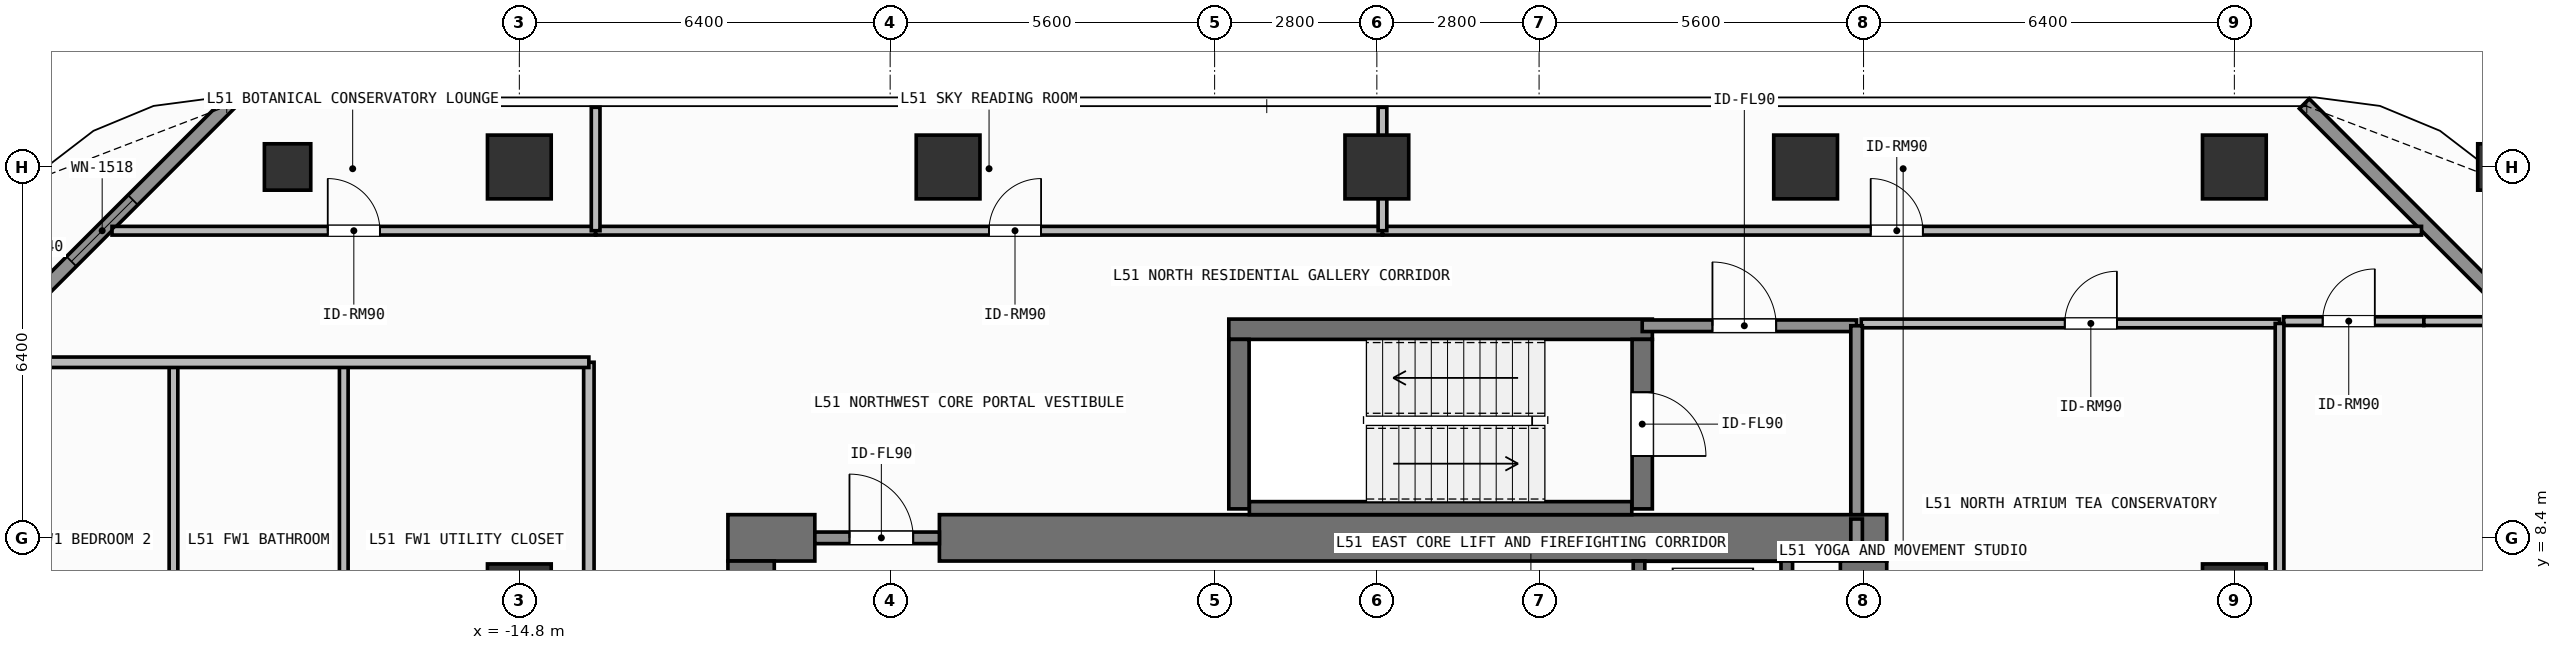
"""IFC4 building model, lengths in metres.
Left out: names, types, materials, properties, quantities, classifications, styles, units other than length and angle.
Written with IfcOpenShell. Run it as: python <this file> out.ifc"""

import sys

from ifc_helpers import new_model, si_unit, direction, frame, frame_2d, origin, origin_2d, place, context, subcontext, project, spatial, rectangle, hollow_rectangle, extrude, element, fill, save


model = new_model("IFC4")
c1 = context("Model", 3, precision=1e-05, world=origin(), true_north=direction((0.0, 1.0)))
c2 = subcontext(c1, "Body", "Model", "MODEL_VIEW")
j1 = project(units=[si_unit("LENGTHUNIT", "METRE"), si_unit("PLANEANGLEUNIT", "RADIAN")], contexts=[c1])
p1 = place(None, origin())
s1 = spatial("IfcSite", under=j1, at=p1, CompositionType="ELEMENT")
p2 = place(p1, origin())
s2 = spatial("IfcBuilding", under=s1, at=p2, CompositionType="ELEMENT")
p3 = place(p2, frame((0.0, 0.0, 207.0)))
s3 = spatial("IfcBuildingStorey", under=s2, at=p3, CompositionType="ELEMENT", Elevation=207.0)
p4 = place(p3, frame((-11.2, 8.4, 0.0), z_axis=(0.0, 0.0, 1.0), x_axis=(1.0, 0.0, 0.0)))
e1 = element("IfcWall", 1, at=p4, inside=s3, PredefinedType="SHEAR", context=c2, shape_type="SweptSolid", body=[
    extrude(rectangle(XDim=1.5, YDim=0.8, at=frame_2d((0.75, 0.0))), origin(), (0.0, 0.0, 1.0), 3.9),
])
p5 = place(p3, frame((-7.55, 8.4, 0.0), z_axis=(0.0, 0.0, 1.0), x_axis=(1.0, 0.0, 0.0)))
e2 = element("IfcWall", 2, at=p5, inside=s3, PredefinedType="SHEAR", context=c2, shape_type="SweptSolid", body=[
    extrude(rectangle(XDim=16.35, YDim=0.8, at=frame_2d((8.175, 0.0))), origin(), (0.0, 0.0, 1.0), 3.9),
])
p6 = place(p3, frame((-10.8, -8.0, 0.0), z_axis=(0.0, 0.0, 1.0), x_axis=(0.0, 1.0, 0.0)))
e3 = element("IfcWall", 3, at=p6, inside=s3, PredefinedType="SHEAR", context=c2, shape_type="SweptSolid", body=[
    extrude(rectangle(XDim=16.0, YDim=0.8, at=frame_2d((8.0, 0.0))), origin(), (0.0, 0.0, 1.0), 3.9),
])
p7 = place(p3, frame((8.4, 5.825, 0.0), z_axis=(0.0, 0.0, 1.0), x_axis=(0.0, 1.0, 0.0)))
e4 = element("IfcWall", 4, at=p7, inside=s3, PredefinedType="SHEAR", context=c2, shape_type="SweptSolid", body=[
    extrude(rectangle(XDim=2.175, YDim=0.8, at=frame_2d((1.087, 0.0))), origin(), (0.0, 0.0, 1.0), 3.9),
])
p8 = place(p3, frame((-2.555, 12.0, 0.0), z_axis=(0.0, 0.0, 1.0), x_axis=(1.0, 0.0, 0.0)))
e5 = element("IfcWall", 5, at=p8, inside=s3, PredefinedType="SHEAR", context=c2, shape_type="SweptSolid", body=[
    extrude(rectangle(XDim=7.31, YDim=0.35, at=frame_2d((3.655, 0.0))), origin(), (0.0, 0.0, 1.0), 3.9),
])
p9 = place(p3, frame((-2.2, 8.913, 0.0), z_axis=(0.0, 0.0, 1.0), x_axis=(1.0, 0.0, 0.0)))
e6 = element("IfcWall", 6, at=p9, inside=s3, PredefinedType="SHEAR", context=c2, shape_type="SweptSolid", body=[
    extrude(rectangle(XDim=6.6, YDim=0.225, at=frame_2d((3.3, 0.0))), origin(), (0.0, 0.0, 1.0), 3.9),
])
p10 = place(p3, frame((-2.38, 8.9, 0.0), z_axis=(0.0, 0.0, 1.0), x_axis=(0.0, 1.0, 0.0)))
e7 = element("IfcWall", 7, at=p10, inside=s3, PredefinedType="SHEAR", context=c2, shape_type="SweptSolid", body=[
    extrude(rectangle(XDim=2.925, YDim=0.35, at=frame_2d((1.462, 0.0))), origin(), (0.0, 0.0, 1.0), 3.9),
])
p11 = place(p3, frame((4.58, 11.825, 0.0), z_axis=(0.0, 0.0, 1.0), x_axis=(0.0, -1.0, 0.0)))
e8 = element("IfcWall", 8, at=p11, inside=s3, PredefinedType="SHEAR", context=c2, shape_type="SweptSolid", body=[
    extrude(rectangle(XDim=2.925, YDim=0.35, at=frame_2d((1.462, 0.0))), origin(), (0.0, 0.0, 1.0), 3.9),
])
p12 = place(p11, frame((0.913, 0.0, 0.0)))
e9 = element("IfcOpeningElement", 9, at=p12, cuts=e8, PredefinedType="OPENING", context=c2, shape_type="SweptSolid", body=[
    extrude(rectangle(XDim=1.1, YDim=2.15, at=frame_2d((0.55, 1.075))), frame((0.0, 0.185, 0.0), z_axis=(0.0, -1.0, 0.0), x_axis=(1.0, 0.0, 0.0)), (0.0, 0.0, 1.0), 0.37),
])
for number, where, z_axis, x_axis in (
    (10, (-14.8, 14.8, 0.0), (0.0, 0.0, 1.0), (1.0, 0.0, 0.0)),
    (11, (-7.4, 14.8, 0.0), (0.0, 0.0, 1.0), (1.0, 0.0, 0.0)),
    (12, (0.0, 14.8, 0.0), (0.0, 0.0, 1.0), (1.0, 0.0, 0.0)),
    (13, (7.4, 14.8, 0.0), (0.0, 0.0, 1.0), (1.0, 0.0, 0.0)),
    (14, (14.8, 14.8, 0.0), (0.0, 0.0, 1.0), (1.0, 0.0, 0.0)),
    (15, (-14.8, 7.4, 0.0), (0.0, 0.0, 1.0), (1.0, 0.0, 0.0)),
    (16, (14.8, 7.4, 0.0), (0.0, 0.0, 1.0), (1.0, 0.0, 0.0)),
):
    element("IfcColumn", number, at=place(p3, frame(where, z_axis=z_axis, x_axis=x_axis)), inside=s3, PredefinedType="COLUMN", context=c2, shape_type="SweptSolid", body=[
        extrude(rectangle(XDim=1.1, YDim=1.1, at=origin_2d()), origin(), (0.0, 0.0, 1.0), 3.9),
    ])
for number, where, z_axis, x_axis in (
    (17, (-18.8, 14.8, 0.0), (0.0, 0.0, 1.0), (1.0, 0.0, 0.0)),
    (18, (19.4, 14.8, 0.0), (0.0, 0.0, 1.0), (1.0, 0.0, 0.0)),
):
    element("IfcColumn", number, at=place(p3, frame(where, z_axis=z_axis, x_axis=x_axis)), inside=s3, PredefinedType="COLUMN", context=c2, shape_type="SweptSolid", body=[
        extrude(hollow_rectangle(XDim=0.8, YDim=0.8, WallThickness=0.036, at=origin_2d()), origin(), (0.0, 0.0, 1.0), 3.9),
    ])
p13 = place(p3, frame((-24.192, 11.508, 0.0), z_axis=(0.0, 0.0, 1.0), x_axis=(0.707106781187, 0.707106781187, 0.0)))
e19 = element("IfcWall", 19, at=p13, inside=s3, PredefinedType="SOLIDWALL", context=c2, shape_type="SweptSolid", body=[
    extrude(rectangle(XDim=6.201, YDim=0.24, at=frame_2d((3.101, 0.0))), origin(), (0.0, 0.0, 1.0), 3.62),
])
p14 = place(p13, frame((2.351, 0.0, 0.8)))
e20 = element("IfcOpeningElement", 20, at=p14, cuts=e19, PredefinedType="OPENING", context=c2, shape_type="SweptSolid", body=[
    extrude(rectangle(XDim=1.5, YDim=1.85, at=frame_2d((0.75, 0.925))), frame((0.0, 0.13, 0.0), z_axis=(0.0, -1.0, 0.0), x_axis=(1.0, 0.0, 0.0)), (0.0, 0.0, 1.0), 0.26),
])
p15 = place(p3, frame((16.008, 15.892, 0.0), z_axis=(0.0, 0.0, 1.0), x_axis=(0.707106781187, -0.707106781187, 0.0)))
e21 = element("IfcWall", 21, at=p15, inside=s3, PredefinedType="SOLIDWALL", context=c2, shape_type="SweptSolid", body=[
    extrude(rectangle(XDim=6.201, YDim=0.24, at=frame_2d((3.101, 0.0))), origin(), (0.0, 0.0, 1.0), 3.62),
])
p16 = place(p3, frame((4.525, 5.825, 0.0), z_axis=(0.0, 0.0, 1.0), x_axis=(0.0, 1.0, 0.0)))
e22 = element("IfcWall", 22, at=p16, inside=s3, PredefinedType="SHEAR", context=c2, shape_type="SweptSolid", body=[
    extrude(rectangle(XDim=2.175, YDim=0.2, at=frame_2d((1.087, 0.0))), origin(), (0.0, 0.0, 1.0), 3.62),
])
p17 = place(p16, frame((0.425, 0.0, 0.0)))
e23 = element("IfcOpeningElement", 23, at=p17, cuts=e22, PredefinedType="OPENING", context=c2, shape_type="SweptSolid", body=[
    extrude(rectangle(XDim=1.1, YDim=2.2, at=frame_2d((0.55, 1.1))), frame((0.0, 0.11, 0.0), z_axis=(0.0, -1.0, 0.0), x_axis=(1.0, 0.0, 0.0)), (0.0, 0.0, 1.0), 0.22),
])
p18 = place(p3, frame((7.075, 5.825, 0.0), z_axis=(0.0, 0.0, 1.0), x_axis=(0.0, 1.0, 0.0)))
e24 = element("IfcWall", 24, at=p18, inside=s3, PredefinedType="SHEAR", context=c2, shape_type="SweptSolid", body=[
    extrude(rectangle(XDim=2.175, YDim=0.2, at=frame_2d((1.087, 0.0))), origin(), (0.0, 0.0, 1.0), 3.62),
])
p19 = place(p3, frame((4.58, 12.06, 0.0), z_axis=(0.0, 0.0, 1.0), x_axis=(1.0, 0.0, 0.0)))
e25 = element("IfcWall", 25, at=p19, inside=s3, PredefinedType="SOLIDWALL", context=c2, shape_type="SweptSolid", body=[
    extrude(rectangle(XDim=3.7, YDim=0.2, at=frame_2d((1.85, 0.0))), origin(), (0.0, 0.0, 1.0), 3.62),
])
p20 = place(p19, frame((1.212, 0.0, 0.0)))
e26 = element("IfcOpeningElement", 26, at=p20, cuts=e25, PredefinedType="OPENING", context=c2, shape_type="SweptSolid", body=[
    extrude(rectangle(XDim=1.1, YDim=2.15, at=frame_2d((0.55, 1.075))), frame((0.0, 0.11, 0.0), z_axis=(0.0, -1.0, 0.0), x_axis=(1.0, 0.0, 0.0)), (0.0, 0.0, 1.0), 0.22),
])
p21 = place(p3, frame((-9.7, 8.4, 0.0), z_axis=(0.0, 0.0, 1.0), x_axis=(1.0, 0.0, 0.0)))
e27 = element("IfcWall", 27, at=p21, inside=s3, PredefinedType="SOLIDWALL", context=c2, shape_type="SweptSolid", body=[
    extrude(rectangle(XDim=2.15, YDim=0.2, at=frame_2d((1.075, 0.0))), origin(), (0.0, 0.0, 1.0), 2.76),
])
p22 = place(p21, frame((0.598, 0.0, 0.0)))
e28 = element("IfcOpeningElement", 28, at=p22, cuts=e27, PredefinedType="OPENING", context=c2, shape_type="SweptSolid", body=[
    extrude(rectangle(XDim=1.1, YDim=2.15, at=frame_2d((0.55, 1.075))), frame((0.0, 0.11, 0.0), z_axis=(0.0, -1.0, 0.0), x_axis=(1.0, 0.0, 0.0)), (0.0, 0.0, 1.0), 0.22),
])
p23 = place(p3, frame((8.36, 12.1, 0.0), z_axis=(0.0, 0.0, 1.0), x_axis=(1.0, 0.0, 0.0)))
e29 = element("IfcWall", 29, at=p23, inside=s3, PredefinedType="PARTITIONING", context=c2, shape_type="SweptSolid", body=[
    extrude(rectangle(XDim=7.22, YDim=0.15, at=frame_2d((3.61, 0.0))), origin(), (0.0, 0.0, 1.0), 3.62),
])
p24 = place(p23, frame((3.513, 0.0, 0.0)))
e30 = element("IfcOpeningElement", 30, at=p24, cuts=e29, PredefinedType="OPENING", context=c2, shape_type="SweptSolid", body=[
    extrude(rectangle(XDim=0.9, YDim=2.1, at=frame_2d((0.45, 1.05))), frame((0.0, 0.085, 0.0), z_axis=(0.0, -1.0, 0.0), x_axis=(1.0, 0.0, 0.0)), (0.0, 0.0, 1.0), 0.17),
])
p25 = place(p3, frame((-21.83, 13.7, 0.0), z_axis=(0.0, 0.0, 1.0), x_axis=(1.0, 0.0, 0.0)))
e31 = element("IfcWall", 31, at=p25, inside=s3, PredefinedType="PARTITIONING", context=c2, shape_type="SweptSolid", body=[
    extrude(rectangle(XDim=8.347, YDim=0.15, at=frame_2d((4.174, 0.0))), origin(), (0.0, 0.0, 1.0), 3.62),
])
p26 = place(p25, frame((3.723, 0.0, 0.0)))
e32 = element("IfcOpeningElement", 32, at=p26, cuts=e31, PredefinedType="OPENING", context=c2, shape_type="SweptSolid", body=[
    extrude(rectangle(XDim=0.9, YDim=2.1, at=frame_2d((0.45, 1.05))), frame((0.0, 0.085, 0.0), z_axis=(0.0, -1.0, 0.0), x_axis=(1.0, 0.0, 0.0)), (0.0, 0.0, 1.0), 0.17),
])
p27 = place(p3, frame((-13.483, 13.7, 0.0), z_axis=(0.0, 0.0, 1.0), x_axis=(1.0, 0.0, 0.0)))
e33 = element("IfcWall", 33, at=p27, inside=s3, PredefinedType="PARTITIONING", context=c2, shape_type="SweptSolid", body=[
    extrude(rectangle(XDim=13.58, YDim=0.15, at=frame_2d((6.79, 0.0))), origin(), (0.0, 0.0, 1.0), 3.62),
])
p28 = place(p27, frame((6.788, 0.0, 0.0)))
e34 = element("IfcOpeningElement", 34, at=p28, cuts=e33, PredefinedType="OPENING", context=c2, shape_type="SweptSolid", body=[
    extrude(rectangle(XDim=0.9, YDim=2.1, at=frame_2d((0.45, 1.05))), frame((0.0, 0.085, 0.0), z_axis=(0.0, -1.0, 0.0), x_axis=(1.0, 0.0, 0.0)), (0.0, 0.0, 1.0), 0.17),
])
p29 = place(p3, frame((0.097, 13.7, 0.0), z_axis=(0.0, 0.0, 1.0), x_axis=(1.0, 0.0, 0.0)))
e35 = element("IfcWall", 35, at=p29, inside=s3, PredefinedType="PARTITIONING", context=c2, shape_type="SweptSolid", body=[
    extrude(rectangle(XDim=17.933, YDim=0.15, at=frame_2d((8.967, 0.0))), origin(), (0.0, 0.0, 1.0), 3.62),
])
p30 = place(p29, frame((8.427, 0.0, 0.0)))
e36 = element("IfcOpeningElement", 36, at=p30, cuts=e35, PredefinedType="OPENING", context=c2, shape_type="SweptSolid", body=[
    extrude(rectangle(XDim=0.9, YDim=2.1, at=frame_2d((0.45, 1.05))), frame((0.0, 0.085, 0.0), z_axis=(0.0, -1.0, 0.0), x_axis=(1.0, 0.0, 0.0)), (0.0, 0.0, 1.0), 0.17),
])
p31 = place(p3, frame((-13.6, -12.12, 0.0), z_axis=(0.0, 0.0, 1.0), x_axis=(0.0, 1.0, 0.0)))
e37 = element("IfcWall", 37, at=p31, inside=s3, PredefinedType="PARTITIONING", context=c2, shape_type="SweptSolid", body=[
    extrude(rectangle(XDim=23.55, YDim=0.18, at=frame_2d((11.775, 0.0))), origin(), (0.0, 0.0, 1.0), 3.62),
])
p32 = place(p31, frame((11.454, 0.0, 0.0)))
e38 = element("IfcOpeningElement", 38, at=p32, cuts=e37, PredefinedType="OPENING", context=c2, shape_type="SweptSolid", body=[
    extrude(rectangle(XDim=1.0, YDim=2.2, at=frame_2d((0.5, 1.1))), frame((0.0, 0.1, 0.0), z_axis=(0.0, -1.0, 0.0), x_axis=(1.0, 0.0, 0.0)), (0.0, 0.0, 1.0), 0.2),
])
p33 = place(p3, frame((15.65, 12.14, 0.0), z_axis=(0.0, 0.0, 1.0), x_axis=(1.0, 0.0, 0.0)))
e39 = element("IfcWall", 39, at=p33, inside=s3, PredefinedType="PARTITIONING", context=c2, shape_type="SweptSolid", body=[
    extrude(rectangle(XDim=2.42, YDim=0.15, at=frame_2d((1.21, 0.0))), origin(), (0.0, 0.0, 1.0), 3.62),
])
p34 = place(p33, frame((0.674, 0.0, 0.0)))
e40 = element("IfcOpeningElement", 40, at=p34, cuts=e39, PredefinedType="OPENING", context=c2, shape_type="SweptSolid", body=[
    extrude(rectangle(XDim=0.9, YDim=2.1, at=frame_2d((0.45, 1.05))), frame((0.0, 0.085, 0.0), z_axis=(0.0, -1.0, 0.0), x_axis=(1.0, 0.0, 0.0)), (0.0, 0.0, 1.0), 0.17),
])
p35 = place(p3, frame((8.28, 8.8, 0.0), z_axis=(0.0, 0.0, 1.0), x_axis=(0.0, 1.0, 0.0)))
e41 = element("IfcWall", 41, at=p35, inside=s3, PredefinedType="SOLIDWALL", context=c2, shape_type="SweptSolid", body=[
    extrude(rectangle(XDim=3.26, YDim=0.2, at=frame_2d((1.63, 0.0))), origin(), (0.0, 0.0, 1.0), 3.62),
])
p36 = place(p3, frame((8.28, 8.1, 0.0), z_axis=(0.0, 0.0, 1.0), x_axis=(0.0, 1.0, 0.0)))
e42 = element("IfcWall", 42, at=p36, inside=s3, PredefinedType="SOLIDWALL", context=c2, shape_type="SweptSolid", body=[
    extrude(rectangle(XDim=0.625, YDim=0.2, at=frame_2d((0.312, 0.0))), origin(), (0.0, 0.0, 1.0), 3.62),
])
p37 = place(p3, frame((15.58, 5.85, 0.0), z_axis=(0.0, 0.0, 1.0), x_axis=(0.0, 1.0, 0.0)))
e43 = element("IfcWall", 43, at=p37, inside=s3, PredefinedType="PARTITIONING", context=c2, shape_type="SweptSolid", body=[
    extrude(rectangle(XDim=6.25, YDim=0.15, at=frame_2d((3.125, 0.0))), origin(), (0.0, 0.0, 1.0), 3.62),
])
for number, where, z_axis, x_axis in (
    (44, (-13.483, 13.7, 0.0), (0.0, 0.0, 1.0), (0.0, 1.0, 0.0)),
    (45, (0.097, 13.7, 0.0), (0.0, 0.0, 1.0), (0.0, 1.0, 0.0)),
):
    element("IfcWall", number, at=place(p3, frame(where, z_axis=z_axis, x_axis=x_axis)), inside=s3, PredefinedType="PARTITIONING", context=c2, shape_type="SweptSolid", body=[
        extrude(rectangle(XDim=2.13, YDim=0.15, at=frame_2d((1.065, 0.0))), origin(), (0.0, 0.0, 1.0), 3.62),
    ])
for number, where, z_axis, x_axis in (
    (46, (-17.83, 5.282, 0.0), (0.0, 0.0, 1.0), (0.0, 1.0, 0.0)),
    (47, (-20.769, 5.282, 0.0), (0.0, 0.0, 1.0), (0.0, 1.0, 0.0)),
):
    element("IfcWall", number, at=place(p3, frame(where, z_axis=z_axis, x_axis=x_axis)), inside=s3, PredefinedType="PARTITIONING", context=c2, shape_type="SweptSolid", body=[
        extrude(rectangle(XDim=6.148, YDim=0.15, at=frame_2d((3.074, 0.0))), origin(), (0.0, 0.0, 1.0), 3.62),
    ])
p38 = place(p3, frame((-24.13, 11.43, 0.0), z_axis=(0.0, 0.0, 1.0), x_axis=(1.0, 0.0, 0.0)))
e48 = element("IfcWall", 48, at=p38, inside=s3, PredefinedType="PARTITIONING", context=c2, shape_type="SweptSolid", body=[
    extrude(rectangle(XDim=10.53, YDim=0.18, at=frame_2d((5.265, 0.0))), origin(), (0.0, 0.0, 1.0), 3.36),
])
p39 = place(p3, frame((18.07, 12.14, 0.0), z_axis=(0.0, 0.0, 1.0), x_axis=(1.0, 0.0, 0.0)))
e49 = element("IfcWall", 49, at=p39, inside=s3, PredefinedType="PARTITIONING", context=c2, shape_type="SweptSolid", body=[
    extrude(rectangle(XDim=1.52, YDim=0.15, at=frame_2d((0.76, 0.0))), origin(), (0.0, 0.0, 1.0), 3.62),
])
p40 = place(p14, origin())
e50 = element("IfcWindow", 50, at=p40, inside=s3, PartitioningType="SINGLE_PANEL", PredefinedType="WINDOW", context=c2, shape_type="SweptSolid", body=[
    extrude(rectangle(XDim=1.5, YDim=1.85, at=frame_2d((0.75, 0.925))), frame((0.0, 0.03, 0.0), z_axis=(0.0, -1.0, 0.0), x_axis=(1.0, 0.0, 0.0)), (0.0, 0.0, 1.0), 0.06),
])
fill(e20, e50)
p41 = place(p12, origin())
e51 = element("IfcDoor", 51, at=p41, inside=s3, OperationType="SINGLE_SWING_RIGHT", PredefinedType="DOOR", context=c2, shape_type="SweptSolid", body=[
    extrude(rectangle(XDim=1.1, YDim=2.15, at=frame_2d((0.55, 1.075))), frame((0.0, 0.025, 0.0), z_axis=(0.0, -1.0, 0.0), x_axis=(1.0, 0.0, 0.0)), (0.0, 0.0, 1.0), 0.05),
])
fill(e9, e51)
p42 = place(p20, origin())
e52 = element("IfcDoor", 52, at=p42, inside=s3, OperationType="SINGLE_SWING_LEFT", PredefinedType="DOOR", context=c2, shape_type="SweptSolid", body=[
    extrude(rectangle(XDim=1.1, YDim=2.15, at=frame_2d((0.55, 1.075))), frame((0.0, 0.025, 0.0), z_axis=(0.0, -1.0, 0.0), x_axis=(1.0, 0.0, 0.0)), (0.0, 0.0, 1.0), 0.05),
])
fill(e26, e52)
p43 = place(p22, origin())
e53 = element("IfcDoor", 53, at=p43, inside=s3, OperationType="SINGLE_SWING_LEFT", PredefinedType="DOOR", context=c2, shape_type="SweptSolid", body=[
    extrude(rectangle(XDim=1.1, YDim=2.15, at=frame_2d((0.55, 1.075))), frame((0.0, 0.025, 0.0), z_axis=(0.0, -1.0, 0.0), x_axis=(1.0, 0.0, 0.0)), (0.0, 0.0, 1.0), 0.05),
])
fill(e28, e53)
p44 = place(p24, origin())
e54 = element("IfcDoor", 54, at=p44, inside=s3, OperationType="SINGLE_SWING_RIGHT", PredefinedType="DOOR", context=c2, shape_type="SweptSolid", body=[
    extrude(rectangle(XDim=0.9, YDim=2.1, at=frame_2d((0.45, 1.05))), frame((0.0, 0.025, 0.0), z_axis=(0.0, -1.0, 0.0), x_axis=(1.0, 0.0, 0.0)), (0.0, 0.0, 1.0), 0.05),
])
fill(e30, e54)
p45 = place(p26, origin())
e55 = element("IfcDoor", 55, at=p45, inside=s3, OperationType="SINGLE_SWING_LEFT", PredefinedType="DOOR", context=c2, shape_type="SweptSolid", body=[
    extrude(rectangle(XDim=0.9, YDim=2.1, at=frame_2d((0.45, 1.05))), frame((0.0, 0.025, 0.0), z_axis=(0.0, -1.0, 0.0), x_axis=(1.0, 0.0, 0.0)), (0.0, 0.0, 1.0), 0.05),
])
fill(e32, e55)
p46 = place(p28, origin())
e56 = element("IfcDoor", 56, at=p46, inside=s3, OperationType="SINGLE_SWING_RIGHT", PredefinedType="DOOR", context=c2, shape_type="SweptSolid", body=[
    extrude(rectangle(XDim=0.9, YDim=2.1, at=frame_2d((0.45, 1.05))), frame((0.0, 0.025, 0.0), z_axis=(0.0, -1.0, 0.0), x_axis=(1.0, 0.0, 0.0)), (0.0, 0.0, 1.0), 0.05),
])
fill(e34, e56)
p47 = place(p30, origin())
e57 = element("IfcDoor", 57, at=p47, inside=s3, OperationType="SINGLE_SWING_LEFT", PredefinedType="DOOR", context=c2, shape_type="SweptSolid", body=[
    extrude(rectangle(XDim=0.9, YDim=2.1, at=frame_2d((0.45, 1.05))), frame((0.0, 0.025, 0.0), z_axis=(0.0, -1.0, 0.0), x_axis=(1.0, 0.0, 0.0)), (0.0, 0.0, 1.0), 0.05),
])
fill(e36, e57)
p48 = place(p34, origin())
e58 = element("IfcDoor", 58, at=p48, inside=s3, OperationType="SINGLE_SWING_RIGHT", PredefinedType="DOOR", context=c2, shape_type="SweptSolid", body=[
    extrude(rectangle(XDim=0.9, YDim=2.1, at=frame_2d((0.45, 1.05))), frame((0.0, 0.025, 0.0), z_axis=(0.0, -1.0, 0.0), x_axis=(1.0, 0.0, 0.0)), (0.0, 0.0, 1.0), 0.05),
])
fill(e40, e58)
save(model, sys.argv[1])
